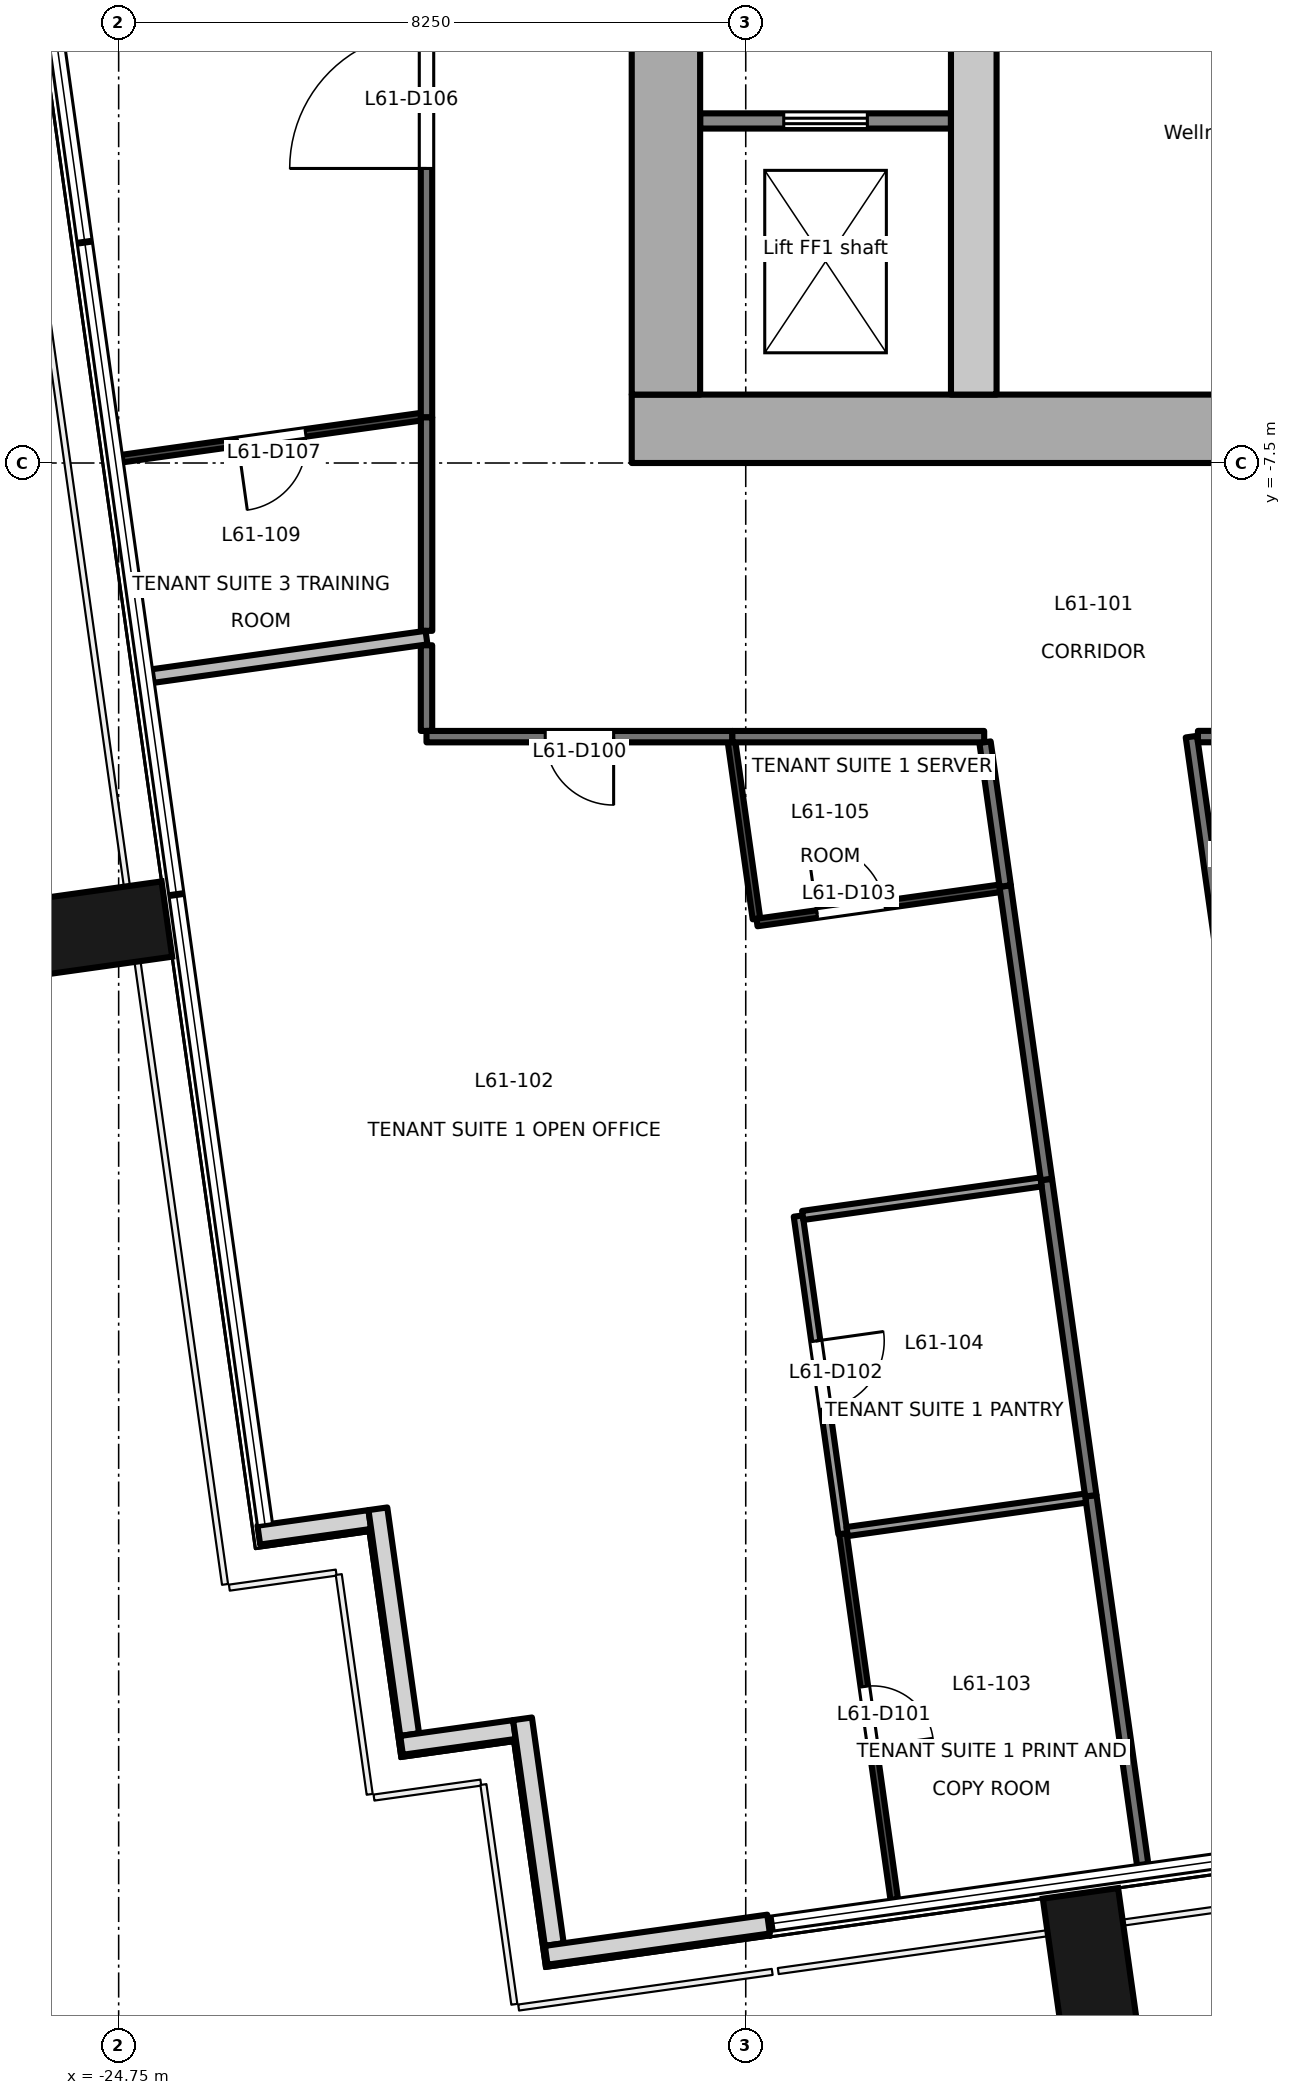
"""IFC4 building model, lengths in metres.
Left out: names, types, materials, properties, quantities, classifications, styles, units other than length and angle.
Written with IfcOpenShell. Run it as: python <this file> out.ifc"""

import sys

from ifc_helpers import new_model, si_unit, direction, frame, frame_2d, origin, origin_2d, place, context, subcontext, project, spatial, rectangle, extrude, element, fill, save


model = new_model("IFC4")
c1 = context("Model", 3, precision=1e-05, world=origin(), true_north=direction((0.0, 1.0)))
c2 = subcontext(c1, "Body", "Model", "MODEL_VIEW")
j1 = project(units=[si_unit("LENGTHUNIT", "METRE"), si_unit("PLANEANGLEUNIT", "RADIAN")], contexts=[c1])
p1 = place(None, origin())
s1 = spatial("IfcSite", under=j1, at=p1, CompositionType="ELEMENT")
p2 = place(p1, origin())
s2 = spatial("IfcBuilding", under=s1, at=p2, CompositionType="ELEMENT")
p3 = place(p2, frame((0.0, 0.0, 266.8)))
s3 = spatial("IfcBuildingStorey", under=s2, at=p3, CompositionType="ELEMENT", Elevation=266.8)
for number, where, z_axis, x_axis in (
    (1, (-11.971, -27.209, -0.2), (0.0, 0.0, 1.0), (0.99, 0.139, 0.0)),
    (2, (-25.007, -13.625, -0.2), (0.0, 0.0, 1.0), (-0.139, 0.99, 0.0)),
):
    element("IfcColumn", number, at=place(p3, frame(where, z_axis=z_axis, x_axis=x_axis)), inside=s3, PredefinedType="COLUMN", context=c2, shape_type="SweptSolid", body=[
        extrude(rectangle(XDim=1.0, YDim=1.8, at=origin_2d()), origin(), (0.0, 0.0, 1.0), 3.9),
    ])
p4 = place(p3, frame((-22.906, -21.605, 0.0), z_axis=(0.0, 0.0, 1.0), x_axis=(0.990235520307, 0.13940449893, 0.0)))
e3 = element("IfcWall", 3, at=p4, inside=s3, PredefinedType="SOLIDWALL", context=c2, shape_type="SweptSolid", body=[
    extrude(rectangle(XDim=1.475, YDim=0.25, at=frame_2d((0.737, 0.0))), origin(), (0.0, 0.0, 1.0), 3.7),
])
p5 = place(p3, frame((-21.34, -21.258, 0.0), z_axis=(0.0, 0.0, 1.0), x_axis=(0.139393225799, -0.990237107263, 0.0)))
e4 = element("IfcWall", 4, at=p5, inside=s3, PredefinedType="SOLIDWALL", context=c2, shape_type="SweptSolid", body=[
    extrude(rectangle(XDim=3.0, YDim=0.25, at=frame_2d((1.5, 0.0))), origin(), (0.0, 0.0, 1.0), 3.7),
])
p6 = place(p3, frame((-21.028, -24.37, 0.0), z_axis=(0.0, 0.0, 1.0), x_axis=(0.990330117064, 0.138730887823, 0.0)))
e5 = element("IfcWall", 5, at=p6, inside=s3, PredefinedType="SOLIDWALL", context=c2, shape_type="SweptSolid", body=[
    extrude(rectangle(XDim=1.499, YDim=0.25, at=frame_2d((0.75, 0.0))), origin(), (0.0, 0.0, 1.0), 3.7),
])
p7 = place(p3, frame((-19.437, -24.021, 0.0), z_axis=(0.0, 0.0, 1.0), x_axis=(0.139358350296, -0.990242015975, 0.0)))
e6 = element("IfcWall", 6, at=p7, inside=s3, PredefinedType="SOLIDWALL", context=c2, shape_type="SweptSolid", body=[
    extrude(rectangle(XDim=2.999, YDim=0.25, at=frame_2d((1.5, 0.0))), origin(), (0.0, 0.0, 1.0), 3.7),
])
p8 = place(p3, frame((-19.125, -27.132, 0.0), z_axis=(0.0, 0.0, 1.0), x_axis=(0.990291981483, 0.139002846771, 0.0)))
e7 = element("IfcWall", 7, at=p8, inside=s3, PredefinedType="SOLIDWALL", context=c2, shape_type="SweptSolid", body=[
    extrude(rectangle(XDim=2.954, YDim=0.25, at=frame_2d((1.477, 0.0))), origin(), (0.0, 0.0, 1.0), 3.7),
])
p9 = place(p3, frame((-18.0, -7.05, -0.2), z_axis=(0.0, 0.0, 1.0), x_axis=(1.0, 0.0, 0.0)))
e8 = element("IfcWall", 8, at=p9, inside=s3, PredefinedType="SHEAR", context=c2, shape_type="SweptSolid", body=[
    extrude(rectangle(XDim=36.0, YDim=0.9, at=frame_2d((18.0, 0.0))), origin(), (0.0, 0.0, 1.0), 3.9),
])
p10 = place(p9, frame((11.3, 0.0, 0.2)))
e9 = element("IfcOpeningElement", 9, at=p10, cuts=e8, PredefinedType="OPENING", context=c2, shape_type="SweptSolid", body=[
    extrude(rectangle(XDim=1.8, YDim=2.1, at=frame_2d((0.9, 1.05))), frame((0.0, 0.46, 0.0), z_axis=(0.0, -1.0, 0.0), x_axis=(1.0, 0.0, 0.0)), (0.0, 0.0, 1.0), 0.921),
])
p11 = place(p9, frame((16.8, 0.0, 0.2)))
e10 = element("IfcOpeningElement", 10, at=p11, cuts=e8, PredefinedType="OPENING", context=c2, shape_type="SweptSolid", body=[
    extrude(rectangle(XDim=2.4, YDim=2.1, at=frame_2d((1.2, 1.05))), frame((0.0, 0.46, 0.0), z_axis=(0.0, -1.0, 0.0), x_axis=(1.0, 0.0, 0.0)), (0.0, 0.0, 1.0), 0.921),
])
p12 = place(p9, frame((26.1, 0.0, 0.2)))
e11 = element("IfcOpeningElement", 11, at=p12, cuts=e8, PredefinedType="OPENING", context=c2, shape_type="SweptSolid", body=[
    extrude(rectangle(XDim=2.4, YDim=2.1, at=frame_2d((1.2, 1.05))), frame((0.0, 0.46, 0.0), z_axis=(0.0, -1.0, 0.0), x_axis=(1.0, 0.0, 0.0)), (0.0, 0.0, 1.0), 0.921),
])
p13 = place(p3, frame((-17.55, -6.6, -0.2), z_axis=(0.0, 0.0, 1.0), x_axis=(0.0, 1.0, 0.0)))
e12 = element("IfcWall", 12, at=p13, inside=s3, PredefinedType="SHEAR", context=c2, shape_type="SweptSolid", body=[
    extrude(rectangle(XDim=13.2, YDim=0.9, at=frame_2d((6.6, 0.0))), origin(), (0.0, 0.0, 1.0), 3.9),
])
p14 = place(p13, frame((4.55, 0.0, 0.2)))
e13 = element("IfcOpeningElement", 13, at=p14, cuts=e12, PredefinedType="OPENING", context=c2, shape_type="SweptSolid", body=[
    extrude(rectangle(XDim=1.2, YDim=2.1, at=frame_2d((0.6, 1.05))), frame((0.0, 0.46, 0.0), z_axis=(0.0, -1.0, 0.0), x_axis=(1.0, 0.0, 0.0)), (0.0, 0.0, 1.0), 0.921),
])
p15 = place(p3, frame((-13.5, -6.6, -0.2), z_axis=(0.0, 0.0, 1.0), x_axis=(0.0, 1.0, 0.0)))
e14 = element("IfcWall", 14, at=p15, inside=s3, PredefinedType="SHEAR", context=c2, shape_type="SweptSolid", body=[
    extrude(rectangle(XDim=13.2, YDim=0.6, at=frame_2d((6.6, 0.0))), origin(), (0.0, 0.0, 1.0), 3.9),
])
p16 = place(p3, frame((-17.1, -3.0, 0.0), z_axis=(0.0, 0.0, 1.0), x_axis=(1.0, 0.0, 0.0)))
e15 = element("IfcWall", 15, at=p16, inside=s3, PredefinedType="PARTITIONING", context=c2, shape_type="SweptSolid", body=[
    extrude(rectangle(XDim=3.3, YDim=0.2, at=frame_2d((1.65, 0.0))), origin(), (0.0, 0.0, 1.0), 3.7),
])
p17 = place(p16, frame((1.1, 0.0, 0.0)))
e16 = element("IfcOpeningElement", 16, at=p17, cuts=e15, PredefinedType="OPENING", context=c2, shape_type="SweptSolid", body=[
    extrude(rectangle(XDim=1.1, YDim=2.1, at=frame_2d((0.55, 1.05))), frame((0.0, 0.111, 0.0), z_axis=(0.0, -1.0, 0.0), x_axis=(1.0, 0.0, 0.0)), (0.0, 0.0, 1.0), 0.221),
])
p18 = place(p3, frame((-20.7, -11.025, 0.0), z_axis=(0.0, 0.0, 1.0), x_axis=(0.0, 1.0, 0.0)))
e17 = element("IfcWall", 17, at=p18, inside=s3, PredefinedType="PARTITIONING", context=c2, shape_type="SweptSolid", body=[
    extrude(rectangle(XDim=1.127, YDim=0.15, at=frame_2d((0.563, 0.0))), origin(), (0.0, 0.0, 1.0), 3.7),
])
p19 = place(p3, frame((-16.676, -11.1, 0.0), z_axis=(0.0, 0.0, 1.0), x_axis=(-1.0, 0.0, 0.0)))
e18 = element("IfcWall", 18, at=p19, inside=s3, PredefinedType="PARTITIONING", context=c2, shape_type="SweptSolid", body=[
    extrude(rectangle(XDim=4.024, YDim=0.15, at=frame_2d((2.012, 0.0))), origin(), (0.0, 0.0, 1.0), 3.7),
])
p20 = place(p19, frame((1.562, 0.0, 0.0)))
e19 = element("IfcOpeningElement", 19, at=p20, cuts=e18, PredefinedType="OPENING", context=c2, shape_type="SweptSolid", body=[
    extrude(rectangle(XDim=0.9, YDim=2.1, at=frame_2d((0.45, 1.05))), frame((0.0, 0.085, 0.0), z_axis=(0.0, -1.0, 0.0), x_axis=(1.0, 0.0, 0.0)), (0.0, 0.0, 1.0), 0.171),
])
p21 = place(p3, frame((-12.544, -16.928, 0.0), z_axis=(0.0, 0.0, 1.0), x_axis=(-0.139221261089, 0.990261299083, 0.0)))
e20 = element("IfcWall", 20, at=p21, inside=s3, PredefinedType="PARTITIONING", context=c2, shape_type="SweptSolid", body=[
    extrude(rectangle(XDim=3.9, YDim=0.15, at=frame_2d((1.95, 0.0))), origin(), (0.0, 0.0, 1.0), 3.7),
])
p22 = place(p3, frame((-11.278, -25.939, 0.0), z_axis=(0.0, 0.0, 1.0), x_axis=(-0.139167797017, 0.990268814148, 0.0)))
e21 = element("IfcWall", 21, at=p22, inside=s3, PredefinedType="PARTITIONING", context=c2, shape_type="SweptSolid", body=[
    extrude(rectangle(XDim=4.9, YDim=0.15, at=frame_2d((2.45, 0.0))), origin(), (0.0, 0.0, 1.0), 3.7),
])
p23 = place(p3, frame((-11.96, -21.087, 0.0), z_axis=(0.0, 0.0, 1.0), x_axis=(-0.139052638616, 0.990284991148, 0.0)))
e22 = element("IfcWall", 22, at=p23, inside=s3, PredefinedType="PARTITIONING", context=c2, shape_type="SweptSolid", body=[
    extrude(rectangle(XDim=4.2, YDim=0.15, at=frame_2d((2.1, 0.0))), origin(), (0.0, 0.0, 1.0), 3.7),
])
p24 = place(p3, frame((-13.363, -11.1, 0.0), z_axis=(0.0, 0.0, 1.0), x_axis=(-1.0, 0.0, 0.0)))
e23 = element("IfcWall", 23, at=p24, inside=s3, PredefinedType="PARTITIONING", context=c2, shape_type="SweptSolid", body=[
    extrude(rectangle(XDim=3.313, YDim=0.15, at=frame_2d((1.656, 0.0))), origin(), (0.0, 0.0, 1.0), 2.8),
])
p25 = place(p3, frame((-13.086, -13.065, 0.0), z_axis=(0.0, 0.0, 1.0), x_axis=(-0.139292033523, 0.990251346577, 0.0)))
e24 = element("IfcWall", 24, at=p25, inside=s3, PredefinedType="PARTITIONING", context=c2, shape_type="SweptSolid", body=[
    extrude(rectangle(XDim=1.91, YDim=0.15, at=frame_2d((0.955, 0.0))), origin(), (0.0, 0.0, 1.0), 2.8),
])
p26 = place(p3, frame((-20.7, -6.9, 0.0), z_axis=(0.0, 0.0, 1.0), x_axis=(0.0, 1.0, 0.0)))
e25 = element("IfcWall", 25, at=p26, inside=s3, PredefinedType="PARTITIONING", context=c2, shape_type="SweptSolid", body=[
    extrude(rectangle(XDim=14.4, YDim=0.15, at=frame_2d((7.2, 0.0))), origin(), (0.0, 0.0, 1.0), 3.3),
])
p27 = place(p26, frame((3.275, 0.0, 0.0)))
e26 = element("IfcOpeningElement", 26, at=p27, cuts=e25, PredefinedType="OPENING", context=c2, shape_type="SweptSolid", body=[
    extrude(rectangle(XDim=1.8, YDim=2.1, at=frame_2d((0.9, 1.05))), frame((0.0, 0.085, 0.0), z_axis=(0.0, -1.0, 0.0), x_axis=(1.0, 0.0, 0.0)), (0.0, 0.0, 1.0), 0.171),
])
p28 = place(p3, frame((-20.699, -9.708, 0.0), z_axis=(0.0, 0.0, 1.0), x_axis=(0.0, 1.0, 0.0)))
e27 = element("IfcWall", 27, at=p28, inside=s3, PredefinedType="PARTITIONING", context=c2, shape_type="SweptSolid", body=[
    extrude(rectangle(XDim=2.808, YDim=0.15, at=frame_2d((1.404, 0.0))), origin(), (0.0, 0.0, 1.0), 3.7),
])
p29 = place(p3, frame((-10.637, -11.1, 0.0), z_axis=(0.0, 0.0, 1.0), x_axis=(0.139146821365, -0.990271761742, 0.0)))
e28 = element("IfcWall", 28, at=p29, inside=s3, PredefinedType="PARTITIONING", context=c2, shape_type="SweptSolid", body=[
    extrude(rectangle(XDim=4.779, YDim=0.15, at=frame_2d((2.39, 0.0))), origin(), (0.0, 0.0, 1.0), 3.7),
])
p30 = place(p3, frame((-7.627, -11.099, 0.0), z_axis=(0.0, 0.0, 1.0), x_axis=(-1.0, 0.0, 0.0)))
e29 = element("IfcWall", 29, at=p30, inside=s3, PredefinedType="PARTITIONING", context=c2, shape_type="SweptSolid", body=[
    extrude(rectangle(XDim=2.924, YDim=0.15, at=frame_2d((1.462, 0.0))), origin(), (0.0, 0.0, 1.0), 2.8),
])
p31 = place(p3, frame((-15.222, -21.586, 0.0), z_axis=(0.0, 0.0, 1.0), x_axis=(0.139120882778, -0.990275406124, 0.0)))
e30 = element("IfcWall", 30, at=p31, inside=s3, PredefinedType="PARTITIONING", context=c2, shape_type="SweptSolid", body=[
    extrude(rectangle(XDim=4.859, YDim=0.1, at=frame_2d((2.43, 0.0))), origin(), (0.0, 0.0, 1.0), 3.7),
])
p32 = place(p31, frame((2.03, 0.0, 0.0)))
e31 = element("IfcOpeningElement", 31, at=p32, cuts=e30, PredefinedType="OPENING", context=c2, shape_type="SweptSolid", body=[
    extrude(rectangle(XDim=0.8, YDim=2.1, at=frame_2d((0.4, 1.05))), frame((0.0, 0.061, 0.0), z_axis=(0.0, -1.0, 0.0), x_axis=(1.0, 0.0, 0.0)), (0.0, 0.0, 1.0), 0.121),
])
p33 = place(p3, frame((-15.809, -17.407, 0.0), z_axis=(0.0, 0.0, 1.0), x_axis=(0.139136935655, -0.99027315077, 0.0)))
e32 = element("IfcWall", 32, at=p33, inside=s3, PredefinedType="PARTITIONING", context=c2, shape_type="SweptSolid", body=[
    extrude(rectangle(XDim=4.22, YDim=0.12, at=frame_2d((2.11, 0.0))), origin(), (0.0, 0.0, 1.0), 3.7),
])
p34 = place(p33, frame((1.66, 0.0, 0.0)))
e33 = element("IfcOpeningElement", 33, at=p34, cuts=e32, PredefinedType="OPENING", context=c2, shape_type="SweptSolid", body=[
    extrude(rectangle(XDim=0.9, YDim=2.1, at=frame_2d((0.45, 1.05))), frame((0.0, 0.071, 0.0), z_axis=(0.0, -1.0, 0.0), x_axis=(1.0, 0.0, 0.0)), (0.0, 0.0, 1.0), 0.141),
])
p35 = place(p3, frame((-12.615, -16.958, 0.0), z_axis=(0.0, 0.0, 1.0), x_axis=(-0.990254086283, -0.139272555084, 0.0)))
e34 = element("IfcWall", 34, at=p35, inside=s3, PredefinedType="PARTITIONING", context=c2, shape_type="SweptSolid", body=[
    extrude(rectangle(XDim=3.166, YDim=0.12, at=frame_2d((1.583, 0.0))), origin(), (0.0, 0.0, 1.0), 2.8),
])
p36 = place(p3, frame((-16.687, -11.168, 0.0), z_axis=(0.0, 0.0, 1.0), x_axis=(0.139560302367, -0.990213573934, 0.0)))
e35 = element("IfcWall", 35, at=p36, inside=s3, PredefinedType="PARTITIONING", context=c2, shape_type="SweptSolid", body=[
    extrude(rectangle(XDim=2.351, YDim=0.1, at=frame_2d((1.176, 0.0))), origin(), (0.0, 0.0, 1.0), 3.7),
])
p37 = place(p3, frame((-16.352, -13.545, 0.0), z_axis=(0.0, 0.0, 1.0), x_axis=(0.990264894561, 0.13919568456, 0.0)))
e36 = element("IfcWall", 36, at=p37, inside=s3, PredefinedType="PARTITIONING", context=c2, shape_type="SweptSolid", body=[
    extrude(rectangle(XDim=3.226, YDim=0.1, at=frame_2d((1.613, 0.0))), origin(), (0.0, 0.0, 1.0), 2.8),
])
p38 = place(p37, frame((0.798, 0.0, 0.0)))
e37 = element("IfcOpeningElement", 37, at=p38, cuts=e36, PredefinedType="OPENING", context=c2, shape_type="SweptSolid", body=[
    extrude(rectangle(XDim=0.9, YDim=2.1, at=frame_2d((0.45, 1.05))), frame((0.0, 0.061, 0.0), z_axis=(0.0, -1.0, 0.0), x_axis=(1.0, 0.0, 0.0)), (0.0, 0.0, 1.0), 0.121),
])
p39 = place(p3, frame((-24.304, -10.303, 0.0), z_axis=(0.0, 0.0, 1.0), x_axis=(0.990292681193, 0.138997861769, 0.0)))
e38 = element("IfcWall", 38, at=p39, inside=s3, PredefinedType="PARTITIONING", context=c2, shape_type="SweptSolid", body=[
    extrude(rectangle(XDim=3.639, YDim=0.18, at=frame_2d((1.82, 0.0))), origin(), (0.0, 0.0, 1.0), 3.7),
])
p40 = place(p3, frame((-15.166, -21.558, 0.0), z_axis=(0.0, 0.0, 1.0), x_axis=(0.990285967974, 0.139045681821, 0.0)))
e39 = element("IfcWall", 39, at=p40, inside=s3, PredefinedType="PARTITIONING", context=c2, shape_type="SweptSolid", body=[
    extrude(rectangle(XDim=3.166, YDim=0.12, at=frame_2d((1.583, 0.0))), origin(), (0.0, 0.0, 1.0), 2.8),
])
p41 = place(p3, frame((-20.768, -6.89, 0.0), z_axis=(0.0, 0.0, 1.0), x_axis=(-0.990313393589, -0.138850215981, 0.0)))
e40 = element("IfcWall", 40, at=p41, inside=s3, PredefinedType="PARTITIONING", context=c2, shape_type="SweptSolid", body=[
    extrude(rectangle(XDim=3.976, YDim=0.1, at=frame_2d((1.988, 0.0))), origin(), (0.0, 0.0, 1.0), 3.7),
])
p42 = place(p41, frame((1.538, 0.0, 0.0)))
e41 = element("IfcOpeningElement", 41, at=p42, cuts=e40, PredefinedType="OPENING", context=c2, shape_type="SweptSolid", body=[
    extrude(rectangle(XDim=0.9, YDim=2.1, at=frame_2d((0.45, 1.05))), frame((0.0, 0.061, 0.0), z_axis=(0.0, -1.0, 0.0), x_axis=(1.0, 0.0, 0.0)), (0.0, 0.0, 1.0), 0.121),
])
p43 = place(p17, origin())
e42 = element("IfcDoor", 42, at=p43, inside=s3, OperationType="DOUBLE_DOOR_SLIDING", PredefinedType="DOOR", context=c2, shape_type="SweptSolid", body=[
    extrude(rectangle(XDim=1.1, YDim=2.1, at=frame_2d((0.55, 1.05))), frame((0.0, 0.025, 0.0), z_axis=(0.0, -1.0, 0.0), x_axis=(1.0, 0.0, 0.0)), (0.0, 0.0, 1.0), 0.05),
])
fill(e16, e42)
p44 = place(p20, origin())
e43 = element("IfcDoor", 43, at=p44, inside=s3, OperationType="SINGLE_SWING_LEFT", PredefinedType="DOOR", context=c2, shape_type="SweptSolid", body=[
    extrude(rectangle(XDim=0.9, YDim=2.1, at=frame_2d((0.45, 1.05))), frame((0.0, 0.025, 0.0), z_axis=(0.0, -1.0, 0.0), x_axis=(1.0, 0.0, 0.0)), (0.0, 0.0, 1.0), 0.05),
])
fill(e19, e43)
p45 = place(p32, origin())
e44 = element("IfcDoor", 44, at=p45, inside=s3, OperationType="SINGLE_SWING_RIGHT", PredefinedType="DOOR", context=c2, shape_type="SweptSolid", body=[
    extrude(rectangle(XDim=0.8, YDim=2.1, at=frame_2d((0.4, 1.05))), frame((0.0, 0.025, 0.0), z_axis=(0.0, -1.0, 0.0), x_axis=(1.0, 0.0, 0.0)), (0.0, 0.0, 1.0), 0.05),
])
fill(e31, e44)
p46 = place(p34, origin())
e45 = element("IfcDoor", 45, at=p46, inside=s3, OperationType="SINGLE_SWING_LEFT", PredefinedType="DOOR", context=c2, shape_type="SweptSolid", body=[
    extrude(rectangle(XDim=0.9, YDim=2.1, at=frame_2d((0.45, 1.05))), frame((0.0, 0.025, 0.0), z_axis=(0.0, -1.0, 0.0), x_axis=(1.0, 0.0, 0.0)), (0.0, 0.0, 1.0), 0.05),
])
fill(e33, e45)
p47 = place(p38, origin())
e46 = element("IfcDoor", 46, at=p47, inside=s3, OperationType="SINGLE_SWING_LEFT", PredefinedType="DOOR", context=c2, shape_type="SweptSolid", body=[
    extrude(rectangle(XDim=0.9, YDim=2.1, at=frame_2d((0.45, 1.05))), frame((0.0, 0.025, 0.0), z_axis=(0.0, -1.0, 0.0), x_axis=(1.0, 0.0, 0.0)), (0.0, 0.0, 1.0), 0.05),
])
fill(e37, e46)
p48 = place(p27, origin())
e47 = element("IfcDoor", 47, at=p48, inside=s3, OperationType="DOUBLE_DOOR_SINGLE_SWING", PredefinedType="DOOR", context=c2, shape_type="SweptSolid", body=[
    extrude(rectangle(XDim=1.8, YDim=2.1, at=frame_2d((0.9, 1.05))), frame((0.0, 0.025, 0.0), z_axis=(0.0, -1.0, 0.0), x_axis=(1.0, 0.0, 0.0)), (0.0, 0.0, 1.0), 0.05),
])
fill(e26, e47)
p49 = place(p42, origin())
e48 = element("IfcDoor", 48, at=p49, inside=s3, OperationType="SINGLE_SWING_RIGHT", PredefinedType="DOOR", context=c2, shape_type="SweptSolid", body=[
    extrude(rectangle(XDim=0.9, YDim=2.1, at=frame_2d((0.45, 1.05))), frame((0.0, 0.025, 0.0), z_axis=(0.0, -1.0, 0.0), x_axis=(1.0, 0.0, 0.0)), (0.0, 0.0, 1.0), 0.05),
])
fill(e41, e48)
save(model, sys.argv[1])
